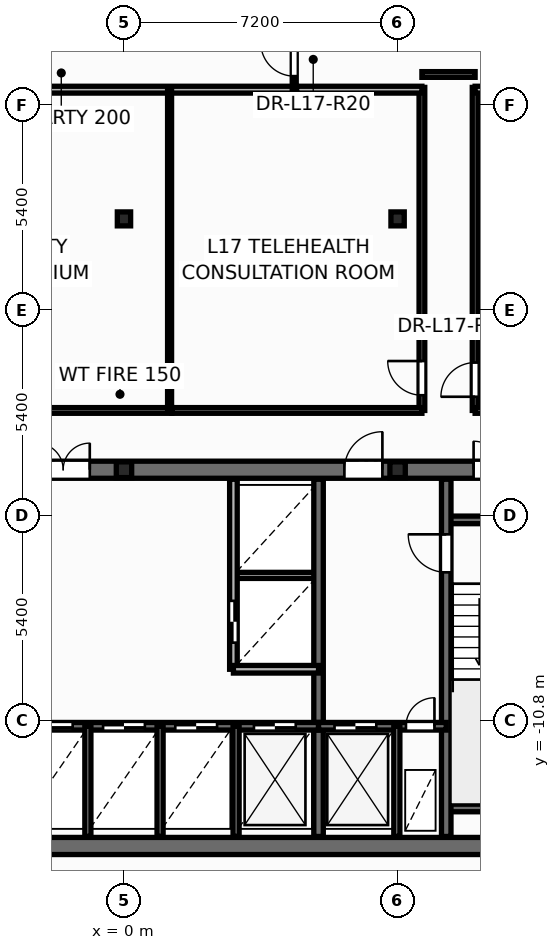
"""IFC4 building model, lengths in metres.
Left out: names, types, materials, properties, quantities, classifications, styles, units other than length and angle.
Written with IfcOpenShell. Run it as: python <this file> out.ifc"""

import sys

from ifc_helpers import new_model, si_unit, direction, frame, frame_2d, origin, origin_2d, place, context, subcontext, project, spatial, rectangle, i_section, extrude, element, fill, save


model = new_model("IFC4")
c1 = context("Model", 3, precision=1e-05, world=origin(), true_north=direction((0.0, 1.0)))
c2 = subcontext(c1, "Body", "Model", "MODEL_VIEW")
j1 = project(units=[si_unit("LENGTHUNIT", "METRE"), si_unit("PLANEANGLEUNIT", "RADIAN")], contexts=[c1])
p1 = place(None, origin())
s1 = spatial("IfcSite", under=j1, at=p1, CompositionType="ELEMENT")
p2 = place(p1, origin())
s2 = spatial("IfcBuilding", under=s1, at=p2, CompositionType="ELEMENT")
p3 = place(p2, frame((0.0, 0.0, 68.4)))
s3 = spatial("IfcBuildingStorey", under=s2, at=p3, CompositionType="ELEMENT", Elevation=68.4)
for number, where, z_axis, x_axis in (
    (1, (0.0, -4.2, 0.0), (0.0, 0.0, 1.0), (1.0, 0.0, 0.0)),
    (2, (7.2, -4.2, 0.0), (0.0, 0.0, 1.0), (1.0, 0.0, 0.0)),
):
    element("IfcColumn", number, at=place(p3, frame(where, z_axis=z_axis, x_axis=x_axis)), inside=s3, PredefinedType="PILASTER", context=c2, shape_type="SweptSolid", body=[
        extrude(i_section(OverallWidth=0.405, OverallDepth=0.414, WebThickness=0.022, FlangeThickness=0.032, at=origin_2d()), origin(), (0.0, 0.0, 1.0), 3.6),
    ])
for number, where, z_axis, x_axis in (
    (3, (0.0, 2.4, 0.0), (0.0, 0.0, 1.0), (1.0, 0.0, 0.0)),
    (4, (7.2, 2.4, 0.0), (0.0, 0.0, 1.0), (1.0, 0.0, 0.0)),
):
    element("IfcColumn", number, at=place(p3, frame(where, z_axis=z_axis, x_axis=x_axis)), inside=s3, PredefinedType="COLUMN", context=c2, shape_type="SweptSolid", body=[
        extrude(i_section(OverallWidth=0.35, OverallDepth=0.367, WebThickness=0.025, FlangeThickness=0.032, at=origin_2d()), origin(), (0.0, 0.0, 1.0), 3.6),
    ])
p4 = place(p3, frame((2.88, -6.98, 0.0), z_axis=(0.0, 0.0, 1.0), x_axis=(1.0, 0.0, 0.0)))
e5 = element("IfcWall", 5, at=p4, inside=s3, PredefinedType="PARTITIONING", context=c2, shape_type="SweptSolid", body=[
    extrude(rectangle(XDim=2.24, YDim=0.16, at=frame_2d((1.12, 0.0))), origin(), (0.0, 0.0, 1.0), 3.35),
])
p5 = place(p3, frame((-12.65, -14.1, 0.0), z_axis=(0.0, 0.0, 1.0), x_axis=(1.0, 0.0, 0.0)))
e6 = element("IfcWall", 6, at=p5, inside=s3, PredefinedType="SHEAR", context=c2, shape_type="SweptSolid", body=[
    extrude(rectangle(XDim=25.3, YDim=0.45, at=frame_2d((12.65, 0.0))), origin(), (0.0, 0.0, 1.0), 3.6),
])
p6 = place(p3, frame((-12.65, -4.2, 0.0), z_axis=(0.0, 0.0, 1.0), x_axis=(1.0, 0.0, 0.0)))
e7 = element("IfcWall", 7, at=p6, inside=s3, PredefinedType="SHEAR", context=c2, shape_type="SweptSolid", body=[
    extrude(rectangle(XDim=25.3, YDim=0.45, at=frame_2d((12.65, 0.0))), origin(), (0.0, 0.0, 1.0), 3.6),
])
p7 = place(p6, frame((0.95, 0.0, 0.0)))
e8 = element("IfcOpeningElement", 8, at=p7, cuts=e7, PredefinedType="OPENING", context=c2, shape_type="SweptSolid", body=[
    extrude(rectangle(XDim=0.756, YDim=2.054, at=frame_2d((0.375, 1.027))), frame((0.0, 0.235, 0.0), z_axis=(0.0, -1.0, 0.0), x_axis=(1.0, 0.0, 0.0)), (0.0, 0.0, 1.0), 0.47),
])
p8 = place(p6, frame((2.6, 0.0, 0.0)))
e9 = element("IfcOpeningElement", 9, at=p8, cuts=e7, PredefinedType="OPENING", context=c2, shape_type="SweptSolid", body=[
    extrude(rectangle(XDim=0.756, YDim=2.054, at=frame_2d((0.375, 1.027))), frame((0.0, 0.235, 0.0), z_axis=(0.0, -1.0, 0.0), x_axis=(1.0, 0.0, 0.0)), (0.0, 0.0, 1.0), 0.47),
])
p9 = place(p6, frame((21.85, 0.0, 0.0)))
e10 = element("IfcOpeningElement", 10, at=p9, cuts=e7, PredefinedType="OPENING", context=c2, shape_type="SweptSolid", body=[
    extrude(rectangle(XDim=0.756, YDim=2.054, at=frame_2d((0.375, 1.027))), frame((0.0, 0.235, 0.0), z_axis=(0.0, -1.0, 0.0), x_axis=(1.0, 0.0, 0.0)), (0.0, 0.0, 1.0), 0.47),
])
p10 = place(p6, frame((23.5, 0.0, 0.0)))
e11 = element("IfcOpeningElement", 11, at=p10, cuts=e7, PredefinedType="OPENING", context=c2, shape_type="SweptSolid", body=[
    extrude(rectangle(XDim=0.756, YDim=2.054, at=frame_2d((0.375, 1.027))), frame((0.0, 0.235, 0.0), z_axis=(0.0, -1.0, 0.0), x_axis=(1.0, 0.0, 0.0)), (0.0, 0.0, 1.0), 0.47),
])
p11 = place(p6, frame((5.85, 0.0, 0.0)))
e12 = element("IfcOpeningElement", 12, at=p11, cuts=e7, PredefinedType="OPENING", context=c2, shape_type="SweptSolid", body=[
    extrude(rectangle(XDim=1.006, YDim=2.104, at=frame_2d((0.5, 1.052))), frame((0.0, 0.235, 0.0), z_axis=(0.0, -1.0, 0.0), x_axis=(1.0, 0.0, 0.0)), (0.0, 0.0, 1.0), 0.47),
])
p12 = place(p6, frame((10.35, 0.0, 0.0)))
e13 = element("IfcOpeningElement", 13, at=p12, cuts=e7, PredefinedType="OPENING", context=c2, shape_type="SweptSolid", body=[
    extrude(rectangle(XDim=1.406, YDim=2.154, at=frame_2d((0.7, 1.077))), frame((0.0, 0.235, 0.0), z_axis=(0.0, -1.0, 0.0), x_axis=(1.0, 0.0, 0.0)), (0.0, 0.0, 1.0), 0.47),
])
p13 = place(p6, frame((18.45, 0.0, 0.0)))
e14 = element("IfcOpeningElement", 14, at=p13, cuts=e7, PredefinedType="OPENING", context=c2, shape_type="SweptSolid", body=[
    extrude(rectangle(XDim=1.006, YDim=2.104, at=frame_2d((0.5, 1.052))), frame((0.0, 0.235, 0.0), z_axis=(0.0, -1.0, 0.0), x_axis=(1.0, 0.0, 0.0)), (0.0, 0.0, 1.0), 0.47),
])
for number, where, z_axis, x_axis in (
    (15, (8.48, -5.52, 0.0), (0.0, 0.0, 1.0), (1.0, 0.0, 0.0)),
    (16, (8.48, -13.1, 0.0), (0.0, 0.0, 1.0), (1.0, 0.0, 0.0)),
):
    element("IfcWall", number, at=place(p3, frame(where, z_axis=z_axis, x_axis=x_axis)), inside=s3, PredefinedType="SOLIDWALL", context=c2, shape_type="SweptSolid", body=[
        extrude(rectangle(XDim=3.87, YDim=0.2, at=frame_2d((1.935, 0.0))), origin(), (0.0, 0.0, 1.0), 3.6),
    ])
p14 = place(p3, frame((8.48, -13.85, 0.0), z_axis=(0.0, 0.0, 1.0), x_axis=(0.0, 1.0, 0.0)))
e17 = element("IfcWall", 17, at=p14, inside=s3, PredefinedType="SHEAR", context=c2, shape_type="SweptSolid", body=[
    extrude(rectangle(XDim=9.4, YDim=0.25, at=frame_2d((4.7, 0.0))), origin(), (0.0, 0.0, 1.0), 3.6),
])
p15 = place(p14, frame((6.95, 0.0, 0.0)))
e18 = element("IfcOpeningElement", 18, at=p15, cuts=e17, PredefinedType="OPENING", context=c2, shape_type="SweptSolid", body=[
    extrude(rectangle(XDim=1.006, YDim=2.104, at=frame_2d((0.5, 1.052))), frame((0.0, 0.135, 0.0), z_axis=(0.0, -1.0, 0.0), x_axis=(1.0, 0.0, 0.0)), (0.0, 0.0, 1.0), 0.27),
])
p16 = place(p3, frame((5.12, -13.85, 0.0), z_axis=(0.0, 0.0, 1.0), x_axis=(0.0, 1.0, 0.0)))
e19 = element("IfcWall", 19, at=p16, inside=s3, PredefinedType="SHEAR", context=c2, shape_type="SweptSolid", body=[
    extrude(rectangle(XDim=9.4, YDim=0.25, at=frame_2d((4.7, 0.0))), origin(), (0.0, 0.0, 1.0), 3.6),
])
p17 = place(p3, frame((-5.12, -10.95, 0.0), z_axis=(0.0, 0.0, 1.0), x_axis=(1.0, 0.0, 0.0)))
e20 = element("IfcWall", 20, at=p17, inside=s3, PredefinedType="SOLIDWALL", context=c2, shape_type="SweptSolid", body=[
    extrude(rectangle(XDim=10.24, YDim=0.2, at=frame_2d((5.12, 0.0))), origin(), (0.0, 0.0, 1.0), 3.6),
])
p18 = place(p17, frame((0.6, 0.0, 0.0)))
e21 = element("IfcOpeningElement", 21, at=p18, cuts=e20, PredefinedType="OPENING", context=c2, shape_type="SweptSolid", body=[
    extrude(rectangle(XDim=1.106, YDim=2.104, at=frame_2d((0.55, 1.052))), frame((0.0, 0.11, 0.0), z_axis=(0.0, -1.0, 0.0), x_axis=(1.0, 0.0, 0.0)), (0.0, 0.0, 1.0), 0.22),
])
p19 = place(p17, frame((2.67, 0.0, 0.0)))
e22 = element("IfcOpeningElement", 22, at=p19, cuts=e20, PredefinedType="OPENING", context=c2, shape_type="SweptSolid", body=[
    extrude(rectangle(XDim=1.106, YDim=2.104, at=frame_2d((0.55, 1.052))), frame((0.0, 0.11, 0.0), z_axis=(0.0, -1.0, 0.0), x_axis=(1.0, 0.0, 0.0)), (0.0, 0.0, 1.0), 0.22),
])
p20 = place(p17, frame((4.57, 0.0, 0.0)))
e23 = element("IfcOpeningElement", 23, at=p20, cuts=e20, PredefinedType="OPENING", context=c2, shape_type="SweptSolid", body=[
    extrude(rectangle(XDim=1.106, YDim=2.104, at=frame_2d((0.55, 1.052))), frame((0.0, 0.11, 0.0), z_axis=(0.0, -1.0, 0.0), x_axis=(1.0, 0.0, 0.0)), (0.0, 0.0, 1.0), 0.22),
])
p21 = place(p17, frame((6.47, 0.0, 0.0)))
e24 = element("IfcOpeningElement", 24, at=p21, cuts=e20, PredefinedType="OPENING", context=c2, shape_type="SweptSolid", body=[
    extrude(rectangle(XDim=1.106, YDim=2.104, at=frame_2d((0.55, 1.052))), frame((0.0, 0.11, 0.0), z_axis=(0.0, -1.0, 0.0), x_axis=(1.0, 0.0, 0.0)), (0.0, 0.0, 1.0), 0.22),
])
p22 = place(p17, frame((8.54, 0.0, 0.0)))
e25 = element("IfcOpeningElement", 25, at=p22, cuts=e20, PredefinedType="OPENING", context=c2, shape_type="SweptSolid", body=[
    extrude(rectangle(XDim=1.106, YDim=2.104, at=frame_2d((0.55, 1.052))), frame((0.0, 0.11, 0.0), z_axis=(0.0, -1.0, 0.0), x_axis=(1.0, 0.0, 0.0)), (0.0, 0.0, 1.0), 0.22),
])
p23 = place(p3, frame((5.12, -10.95, 0.0), z_axis=(0.0, 0.0, 1.0), x_axis=(1.0, 0.0, 0.0)))
e26 = element("IfcWall", 26, at=p23, inside=s3, PredefinedType="SOLIDWALL", context=c2, shape_type="SweptSolid", body=[
    extrude(rectangle(XDim=3.36, YDim=0.2, at=frame_2d((1.68, 0.0))), origin(), (0.0, 0.0, 1.0), 3.6),
])
p24 = place(p23, frame((0.42, 0.0, 0.0)))
e27 = element("IfcOpeningElement", 27, at=p24, cuts=e26, PredefinedType="OPENING", context=c2, shape_type="SweptSolid", body=[
    extrude(rectangle(XDim=1.106, YDim=2.104, at=frame_2d((0.55, 1.052))), frame((0.0, 0.11, 0.0), z_axis=(0.0, -1.0, 0.0), x_axis=(1.0, 0.0, 0.0)), (0.0, 0.0, 1.0), 0.22),
])
p25 = place(p23, frame((2.3, 0.0, 0.0)))
e28 = element("IfcOpeningElement", 28, at=p25, cuts=e26, PredefinedType="OPENING", context=c2, shape_type="SweptSolid", body=[
    extrude(rectangle(XDim=0.756, YDim=2.054, at=frame_2d((0.375, 1.027))), frame((0.0, 0.11, 0.0), z_axis=(0.0, -1.0, 0.0), x_axis=(1.0, 0.0, 0.0)), (0.0, 0.0, 1.0), 0.22),
])
for number, where, z_axis, x_axis in (
    (29, (7.18, -13.85, 0.0), (0.0, 0.0, 1.0), (0.0, 1.0, 0.0)),
    (30, (2.95, -13.85, 0.0), (0.0, 0.0, 1.0), (0.0, 1.0, 0.0)),
):
    element("IfcWall", number, at=place(p3, frame(where, z_axis=z_axis, x_axis=x_axis)), inside=s3, PredefinedType="PARTITIONING", context=c2, shape_type="SweptSolid", body=[
        extrude(rectangle(XDim=2.9, YDim=0.16, at=frame_2d((1.45, 0.0))), origin(), (0.0, 0.0, 1.0), 2.375),
    ])
p26 = place(p3, frame((2.88, -9.45, 0.0), z_axis=(0.0, 0.0, 1.0), x_axis=(0.0, 1.0, 0.0)))
e31 = element("IfcWall", 31, at=p26, inside=s3, PredefinedType="SOLIDWALL", context=c2, shape_type="SweptSolid", body=[
    extrude(rectangle(XDim=5.0, YDim=0.2, at=frame_2d((2.5, 0.0))), origin(), (0.0, 0.0, 1.0), 3.35),
])
p27 = place(p26, frame((0.7, 0.0, 0.0)))
e32 = element("IfcOpeningElement", 32, at=p27, cuts=e31, PredefinedType="OPENING", context=c2, shape_type="SweptSolid", body=[
    extrude(rectangle(XDim=1.106, YDim=2.104, at=frame_2d((0.55, 1.052))), frame((0.0, 0.11, 0.0), z_axis=(0.0, -1.0, 0.0), x_axis=(1.0, 0.0, 0.0)), (0.0, 0.0, 1.0), 0.22),
])
p28 = place(p3, frame((2.88, -9.45, 0.0), z_axis=(0.0, 0.0, 1.0), x_axis=(1.0, 0.0, 0.0)))
e33 = element("IfcWall", 33, at=p28, inside=s3, PredefinedType="SOLIDWALL", context=c2, shape_type="SweptSolid", body=[
    extrude(rectangle(XDim=2.24, YDim=0.2, at=frame_2d((1.12, 0.0))), origin(), (0.0, 0.0, 1.0), 3.35),
])
for number, where, z_axis, x_axis in (
    (34, (-0.95, -13.85, 0.0), (0.0, 0.0, 1.0), (0.0, 1.0, 0.0)),
    (35, (0.95, -13.85, 0.0), (0.0, 0.0, 1.0), (0.0, 1.0, 0.0)),
):
    element("IfcWall", number, at=place(p3, frame(where, z_axis=z_axis, x_axis=x_axis)), inside=s3, PredefinedType="PARTITIONING", context=c2, shape_type="SweptSolid", body=[
        extrude(rectangle(XDim=2.9, YDim=0.16, at=frame_2d((1.45, 0.0))), origin(), (0.0, 0.0, 1.0), 2.375),
    ])
p29 = place(p3, frame((-7.84, -2.64, 0.0), z_axis=(0.0, 0.0, 1.0), x_axis=(1.0, 0.0, 0.0)))
e36 = element("IfcWall", 36, at=p29, inside=s3, PredefinedType="PARTITIONING", context=c2, shape_type="SweptSolid", body=[
    extrude(rectangle(XDim=9.1, YDim=0.15, at=frame_2d((4.55, 0.0))), origin(), (0.0, 0.0, 1.0), 2.325),
])
p30 = place(p29, frame((2.11, 0.0, 0.0)))
e37 = element("IfcOpeningElement", 37, at=p30, cuts=e36, PredefinedType="OPENING", context=c2, shape_type="SweptSolid", body=[
    extrude(rectangle(XDim=0.906, YDim=2.104, at=frame_2d((0.45, 1.052))), frame((0.0, 0.085, 0.0), z_axis=(0.0, -1.0, 0.0), x_axis=(1.0, 0.0, 0.0)), (0.0, 0.0, 1.0), 0.17),
])
p31 = place(p3, frame((-7.84, 5.8, 0.0), z_axis=(0.0, 0.0, 1.0), x_axis=(1.0, 0.0, 0.0)))
e38 = element("IfcWall", 38, at=p31, inside=s3, PredefinedType="PARTITIONING", context=c2, shape_type="SweptSolid", body=[
    extrude(rectangle(XDim=12.38, YDim=0.18, at=frame_2d((6.19, 0.0))), origin(), (0.0, 0.0, 1.0), 2.325),
])
p32 = place(p3, frame((7.84, -2.64, 0.0), z_axis=(0.0, 0.0, 1.0), x_axis=(0.0, 1.0, 0.0)))
e39 = element("IfcWall", 39, at=p32, inside=s3, PredefinedType="PARTITIONING", context=c2, shape_type="SweptSolid", body=[
    extrude(rectangle(XDim=8.5, YDim=0.15, at=frame_2d((4.25, 0.0))), origin(), (0.0, 0.0, 1.0), 2.509),
])
p33 = place(p32, frame((0.4, 0.0, 0.0)))
e40 = element("IfcOpeningElement", 40, at=p33, cuts=e39, PredefinedType="OPENING", context=c2, shape_type="SweptSolid", body=[
    extrude(rectangle(XDim=0.906, YDim=2.104, at=frame_2d((0.45, 1.052))), frame((0.0, 0.085, 0.0), z_axis=(0.0, -1.0, 0.0), x_axis=(1.0, 0.0, 0.0)), (0.0, 0.0, 1.0), 0.17),
])
p34 = place(p3, frame((9.24, -2.64, 0.0), z_axis=(0.0, 0.0, 1.0), x_axis=(0.0, 1.0, 0.0)))
e41 = element("IfcWall", 41, at=p34, inside=s3, PredefinedType="PARTITIONING", context=c2, shape_type="SweptSolid", body=[
    extrude(rectangle(XDim=8.5, YDim=0.15, at=frame_2d((4.25, 0.0))), origin(), (0.0, 0.0, 1.0), 2.509),
])
p35 = place(p34, frame((0.36, 0.0, 0.0)))
e42 = element("IfcOpeningElement", 42, at=p35, cuts=e41, PredefinedType="OPENING", context=c2, shape_type="SweptSolid", body=[
    extrude(rectangle(XDim=0.906, YDim=2.104, at=frame_2d((0.45, 1.052))), frame((0.0, 0.085, 0.0), z_axis=(0.0, -1.0, 0.0), x_axis=(1.0, 0.0, 0.0)), (0.0, 0.0, 1.0), 0.17),
])
p36 = place(p3, frame((1.2, -2.64, 0.0), z_axis=(0.0, 0.0, 1.0), x_axis=(0.0, 1.0, 0.0)))
e43 = element("IfcWall", 43, at=p36, inside=s3, PredefinedType="PARTITIONING", context=c2, shape_type="SweptSolid", body=[
    extrude(rectangle(XDim=8.44, YDim=0.105, at=frame_2d((4.22, 0.0))), origin(), (0.0, 0.0, 1.0), 2.325),
])
p37 = place(p3, frame((1.262, -2.64, 0.0), z_axis=(0.0, 0.0, 1.0), x_axis=(1.0, 0.0, 0.0)))
e44 = element("IfcWall", 44, at=p37, inside=s3, PredefinedType="PARTITIONING", context=c2, shape_type="SweptSolid", body=[
    extrude(rectangle(XDim=6.578, YDim=0.15, at=frame_2d((3.289, 0.0))), origin(), (0.0, 0.0, 1.0), 2.325),
])
p38 = place(p3, frame((4.48, 5.8, 0.0), z_axis=(0.0, 0.0, 1.0), x_axis=(0.0, 1.0, 0.0)))
e45 = element("IfcWall", 45, at=p38, inside=s3, PredefinedType="PARTITIONING", context=c2, shape_type="SweptSolid", body=[
    extrude(rectangle(XDim=3.88, YDim=0.105, at=frame_2d((1.94, 0.0))), origin(), (0.0, 0.0, 1.0), 2.509),
])
p39 = place(p38, frame((0.357, 0.0, 0.0)))
e46 = element("IfcOpeningElement", 46, at=p39, cuts=e45, PredefinedType="OPENING", context=c2, shape_type="SweptSolid", body=[
    extrude(rectangle(XDim=0.886, YDim=2.104, at=frame_2d((0.44, 1.052))), frame((0.0, 0.062, 0.0), z_axis=(0.0, -1.0, 0.0), x_axis=(1.0, 0.0, 0.0)), (0.0, 0.0, 1.0), 0.125),
])
p40 = place(p3, frame((4.542, 5.8, 0.0), z_axis=(0.0, 0.0, 1.0), x_axis=(1.0, 0.0, 0.0)))
e47 = element("IfcWall", 47, at=p40, inside=s3, PredefinedType="PARTITIONING", context=c2, shape_type="SweptSolid", body=[
    extrude(rectangle(XDim=3.298, YDim=0.18, at=frame_2d((1.649, 0.0))), origin(), (0.0, 0.0, 1.0), 2.509),
])
p41 = place(p3, frame((9.24, 5.8, 0.0), z_axis=(0.0, 0.0, 1.0), x_axis=(1.0, 0.0, 0.0)))
e48 = element("IfcWall", 48, at=p41, inside=s3, PredefinedType="PARTITIONING", context=c2, shape_type="SweptSolid", body=[
    extrude(rectangle(XDim=3.376, YDim=0.18, at=frame_2d((1.688, 0.0))), origin(), (0.0, 0.0, 1.0), 2.509),
])
p42 = place(p3, frame((9.24, -2.64, 0.0), z_axis=(0.0, 0.0, 1.0), x_axis=(1.0, 0.0, 0.0)))
e49 = element("IfcWall", 49, at=p42, inside=s3, PredefinedType="PARTITIONING", context=c2, shape_type="SweptSolid", body=[
    extrude(rectangle(XDim=3.26, YDim=0.15, at=frame_2d((1.63, 0.0))), origin(), (0.0, 0.0, 1.0), 3.35),
])
p43 = place(p3, frame((7.84, 6.2, 0.0), z_axis=(0.0, 0.0, 1.0), x_axis=(1.0, 0.0, 0.0)))
e50 = element("IfcWall", 50, at=p43, inside=s3, PredefinedType="PARTITIONING", context=c2, shape_type="SweptSolid", body=[
    extrude(rectangle(XDim=1.4, YDim=0.15, at=frame_2d((0.7, 0.0))), origin(), (0.0, 0.0, 1.0), 3.35),
])
p44 = place(p27, origin())
e51 = element("IfcDoor", 51, at=p44, inside=s3, OperationType="DOUBLE_DOOR_SLIDING", PredefinedType="DOOR", context=c2, shape_type="SweptSolid", body=[
    extrude(rectangle(XDim=1.1, YDim=2.1, at=frame_2d((0.55, 1.05))), frame((0.0, 0.025, 0.0), z_axis=(0.0, -1.0, 0.0), x_axis=(1.0, 0.0, 0.0)), (0.0, 0.0, 1.0), 0.05),
])
fill(e32, e51)
p45 = place(p15, origin())
e52 = element("IfcDoor", 52, at=p45, inside=s3, OperationType="SINGLE_SWING_RIGHT", PredefinedType="DOOR", context=c2, shape_type="SweptSolid", body=[
    extrude(rectangle(XDim=1.0, YDim=2.1, at=frame_2d((0.5, 1.05))), frame((0.0, 0.025, 0.0), z_axis=(0.0, -1.0, 0.0), x_axis=(1.0, 0.0, 0.0)), (0.0, 0.0, 1.0), 0.05),
])
fill(e18, e52)
p46 = place(p24, origin())
e53 = element("IfcDoor", 53, at=p46, inside=s3, OperationType="DOUBLE_DOOR_SLIDING", PredefinedType="DOOR", context=c2, shape_type="SweptSolid", body=[
    extrude(rectangle(XDim=1.1, YDim=2.1, at=frame_2d((0.55, 1.05))), frame((0.0, 0.025, 0.0), z_axis=(0.0, -1.0, 0.0), x_axis=(1.0, 0.0, 0.0)), (0.0, 0.0, 1.0), 0.05),
])
fill(e27, e53)
p47 = place(p25, origin())
e54 = element("IfcDoor", 54, at=p47, inside=s3, OperationType="SINGLE_SWING_RIGHT", PredefinedType="DOOR", context=c2, shape_type="SweptSolid", body=[
    extrude(rectangle(XDim=0.75, YDim=2.05, at=frame_2d((0.375, 1.025))), frame((0.0, 0.025, 0.0), z_axis=(0.0, -1.0, 0.0), x_axis=(1.0, 0.0, 0.0)), (0.0, 0.0, 1.0), 0.05),
])
fill(e28, e54)
p48 = place(p19, origin())
e55 = element("IfcDoor", 55, at=p48, inside=s3, OperationType="DOUBLE_DOOR_SLIDING", PredefinedType="DOOR", context=c2, shape_type="SweptSolid", body=[
    extrude(rectangle(XDim=1.1, YDim=2.1, at=frame_2d((0.55, 1.05))), frame((0.0, 0.025, 0.0), z_axis=(0.0, -1.0, 0.0), x_axis=(1.0, 0.0, 0.0)), (0.0, 0.0, 1.0), 0.05),
])
fill(e22, e55)
p49 = place(p20, origin())
e56 = element("IfcDoor", 56, at=p49, inside=s3, OperationType="DOUBLE_DOOR_SLIDING", PredefinedType="DOOR", context=c2, shape_type="SweptSolid", body=[
    extrude(rectangle(XDim=1.1, YDim=2.1, at=frame_2d((0.55, 1.05))), frame((0.0, 0.025, 0.0), z_axis=(0.0, -1.0, 0.0), x_axis=(1.0, 0.0, 0.0)), (0.0, 0.0, 1.0), 0.05),
])
fill(e23, e56)
p50 = place(p21, origin())
e57 = element("IfcDoor", 57, at=p50, inside=s3, OperationType="DOUBLE_DOOR_SLIDING", PredefinedType="DOOR", context=c2, shape_type="SweptSolid", body=[
    extrude(rectangle(XDim=1.1, YDim=2.1, at=frame_2d((0.55, 1.05))), frame((0.0, 0.025, 0.0), z_axis=(0.0, -1.0, 0.0), x_axis=(1.0, 0.0, 0.0)), (0.0, 0.0, 1.0), 0.05),
])
fill(e24, e57)
p51 = place(p22, origin())
e58 = element("IfcDoor", 58, at=p51, inside=s3, OperationType="DOUBLE_DOOR_SLIDING", PredefinedType="DOOR", context=c2, shape_type="SweptSolid", body=[
    extrude(rectangle(XDim=1.1, YDim=2.1, at=frame_2d((0.55, 1.05))), frame((0.0, 0.025, 0.0), z_axis=(0.0, -1.0, 0.0), x_axis=(1.0, 0.0, 0.0)), (0.0, 0.0, 1.0), 0.05),
])
fill(e25, e58)
p52 = place(p9, origin())
e59 = element("IfcDoor", 59, at=p52, inside=s3, OperationType="SINGLE_SWING_LEFT", PredefinedType="DOOR", context=c2, shape_type="SweptSolid", body=[
    extrude(rectangle(XDim=0.75, YDim=2.05, at=frame_2d((0.375, 1.025))), frame((0.0, 0.025, 0.0), z_axis=(0.0, -1.0, 0.0), x_axis=(1.0, 0.0, 0.0)), (0.0, 0.0, 1.0), 0.05),
])
fill(e10, e59)
p53 = place(p12, origin())
e60 = element("IfcDoor", 60, at=p53, inside=s3, OperationType="DOUBLE_DOOR_SINGLE_SWING", PredefinedType="DOOR", context=c2, shape_type="SweptSolid", body=[
    extrude(rectangle(XDim=1.4, YDim=2.15, at=frame_2d((0.7, 1.075))), frame((0.0, 0.025, 0.0), z_axis=(0.0, -1.0, 0.0), x_axis=(1.0, 0.0, 0.0)), (0.0, 0.0, 1.0), 0.05),
])
fill(e13, e60)
p54 = place(p13, origin())
e61 = element("IfcDoor", 61, at=p54, inside=s3, OperationType="SINGLE_SWING_RIGHT", PredefinedType="DOOR", context=c2, shape_type="SweptSolid", body=[
    extrude(rectangle(XDim=1.0, YDim=2.1, at=frame_2d((0.5, 1.05))), frame((0.0, 0.025, 0.0), z_axis=(0.0, -1.0, 0.0), x_axis=(1.0, 0.0, 0.0)), (0.0, 0.0, 1.0), 0.05),
])
fill(e14, e61)
p55 = place(p33, origin())
e62 = element("IfcDoor", 62, at=p55, inside=s3, OperationType="SINGLE_SWING_RIGHT", PredefinedType="DOOR", context=c2, shape_type="SweptSolid", body=[
    extrude(rectangle(XDim=0.9, YDim=2.1, at=frame_2d((0.45, 1.05))), frame((0.0, 0.025, 0.0), z_axis=(0.0, -1.0, 0.0), x_axis=(1.0, 0.0, 0.0)), (0.0, 0.0, 1.0), 0.05),
])
fill(e40, e62)
p56 = place(p35, origin())
e63 = element("IfcDoor", 63, at=p56, inside=s3, OperationType="SINGLE_SWING_LEFT", PredefinedType="DOOR", context=c2, shape_type="SweptSolid", body=[
    extrude(rectangle(XDim=0.9, YDim=2.1, at=frame_2d((0.45, 1.05))), frame((0.0, 0.025, 0.0), z_axis=(0.0, -1.0, 0.0), x_axis=(1.0, 0.0, 0.0)), (0.0, 0.0, 1.0), 0.05),
])
fill(e42, e63)
p57 = place(p39, origin())
e64 = element("IfcDoor", 64, at=p57, inside=s3, OperationType="SINGLE_SWING_RIGHT", PredefinedType="DOOR", context=c2, shape_type="SweptSolid", body=[
    extrude(rectangle(XDim=0.88, YDim=2.1, at=frame_2d((0.44, 1.05))), frame((0.0, 0.025, 0.0), z_axis=(0.0, -1.0, 0.0), x_axis=(1.0, 0.0, 0.0)), (0.0, 0.0, 1.0), 0.05),
])
fill(e46, e64)
save(model, sys.argv[1])
